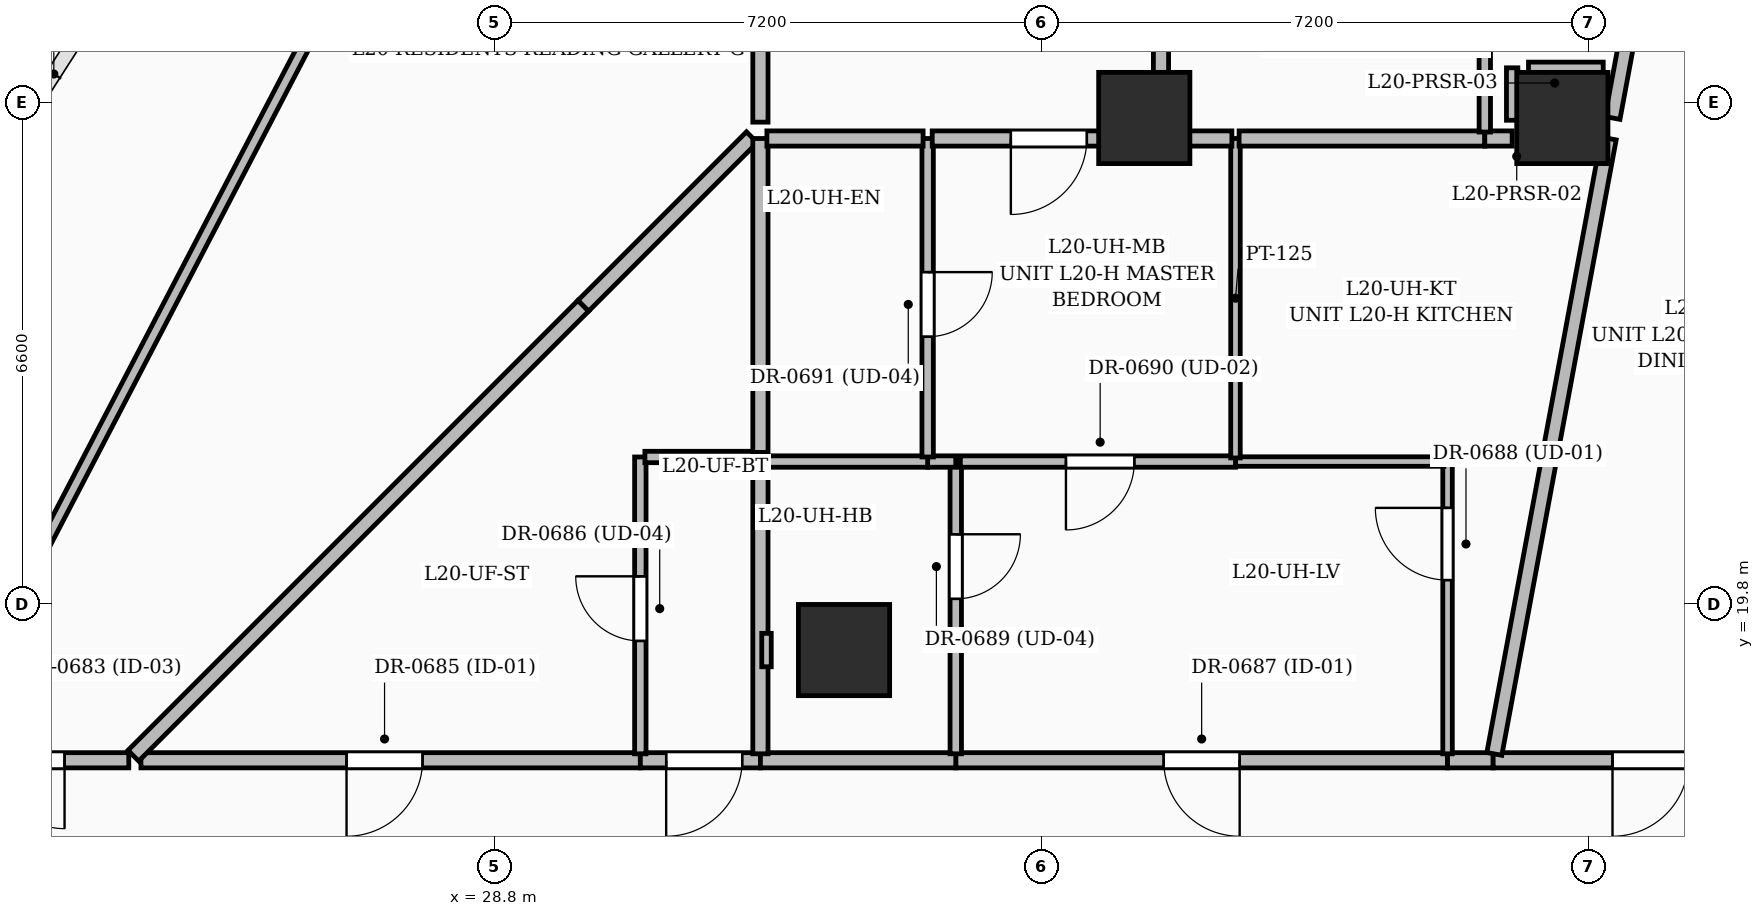
"""IFC4 building model, lengths in metres.
Left out: names, types, materials, properties, quantities, classifications, styles, units other than length and angle.
Written with IfcOpenShell. Run it as: python <this file> out.ifc"""

import sys

from ifc_helpers import new_model, si_unit, direction, frame, frame_2d, origin, origin_2d, place, context, subcontext, project, spatial, rectangle, extrude, element, fill, save


model = new_model("IFC4")
c1 = context("Model", 3, precision=1e-05, world=origin(), true_north=direction((0.0, 1.0)))
c2 = subcontext(c1, "Body", "Model", "MODEL_VIEW")
j1 = project(units=[si_unit("LENGTHUNIT", "METRE"), si_unit("PLANEANGLEUNIT", "RADIAN")], contexts=[c1])
p1 = place(None, origin())
s1 = spatial("IfcSite", under=j1, at=p1, CompositionType="ELEMENT")
p2 = place(p1, origin())
s2 = spatial("IfcBuilding", under=s1, at=p2, CompositionType="ELEMENT")
p3 = place(p2, frame((0.0, 0.0, 82.2)))
s3 = spatial("IfcBuildingStorey", under=s2, at=p3, CompositionType="ELEMENT", Elevation=82.2)
for number, where, z_axis, x_axis in (
    (1, (42.85, 26.2, 0.0), (0.0, 0.0, 1.0), (1.0, 0.0, 0.0)),
    (2, (37.35, 26.2, 0.0), (0.0, 0.0, 1.0), (1.0, 0.0, 0.0)),
    (3, (33.4, 19.2, 0.0), (0.0, 0.0, 1.0), (1.0, 0.0, 0.0)),
):
    element("IfcColumn", number, at=place(p3, frame(where, z_axis=z_axis, x_axis=x_axis)), inside=s3, PredefinedType="COLUMN", context=c2, shape_type="SweptSolid", body=[
        extrude(rectangle(XDim=1.2, YDim=1.2, at=origin_2d()), origin(), (0.0, 0.0, 1.0), 3.6),
    ])
p4 = place(p3, frame((30.72, 17.75, 0.0), z_axis=(0.0, 0.0, 1.0), x_axis=(-1.0, 0.0, 0.0)))
e4 = element("IfcWall", 4, at=p4, inside=s3, PredefinedType="PARTITIONING", context=c2, shape_type="SweptSolid", body=[
    extrude(rectangle(XDim=6.57, YDim=0.2, at=frame_2d((3.285, 0.0))), origin(), (0.0, 0.0, 1.0), 2.345),
])
p5 = place(p4, frame((2.865, 0.0, 0.0)))
e5 = element("IfcOpeningElement", 5, at=p5, cuts=e4, PredefinedType="OPENING", context=c2, shape_type="SweptSolid", body=[
    extrude(rectangle(XDim=1.0, YDim=2.2, at=frame_2d((0.5, 1.1))), frame((0.0, 0.11, 0.0), z_axis=(0.0, -1.0, 0.0), x_axis=(1.0, 0.0, 0.0)), (0.0, 0.0, 1.0), 0.22),
])
p6 = place(p3, frame((32.3, 17.75, 0.0), z_axis=(0.0, 0.0, 1.0), x_axis=(-1.0, 0.0, 0.0)))
e6 = element("IfcWall", 6, at=p6, inside=s3, PredefinedType="PARTITIONING", context=c2, shape_type="SweptSolid", body=[
    extrude(rectangle(XDim=1.58, YDim=0.2, at=frame_2d((0.79, 0.0))), origin(), (0.0, 0.0, 1.0), 3.35),
])
p7 = place(p6, frame((0.24, 0.0, 0.0)))
e7 = element("IfcOpeningElement", 7, at=p7, cuts=e6, PredefinedType="OPENING", context=c2, shape_type="SweptSolid", body=[
    extrude(rectangle(XDim=1.0, YDim=2.2, at=frame_2d((0.5, 1.1))), frame((0.0, 0.11, 0.0), z_axis=(0.0, -1.0, 0.0), x_axis=(1.0, 0.0, 0.0)), (0.0, 0.0, 1.0), 0.22),
])
p8 = place(p3, frame((23.99, 17.75, 0.0), z_axis=(0.0, 0.0, 1.0), x_axis=(-1.0, 0.0, 0.0)))
e8 = element("IfcWall", 8, at=p8, inside=s3, PredefinedType="PARTITIONING", context=c2, shape_type="SweptSolid", body=[
    extrude(rectangle(XDim=2.505, YDim=0.2, at=frame_2d((1.252, 0.0))), origin(), (0.0, 0.0, 1.0), 2.345),
])
p9 = place(p8, frame((0.845, 0.0, 0.0)))
e9 = element("IfcOpeningElement", 9, at=p9, cuts=e8, PredefinedType="OPENING", context=c2, shape_type="SweptSolid", body=[
    extrude(rectangle(XDim=0.9, YDim=2.1, at=frame_2d((0.45, 1.05))), frame((0.0, 0.11, 0.0), z_axis=(0.0, -1.0, 0.0), x_axis=(1.0, 0.0, 0.0)), (0.0, 0.0, 1.0), 0.22),
])
p10 = place(p3, frame((41.34, 17.75, 0.0), z_axis=(0.0, 0.0, 1.0), x_axis=(-1.0, 0.0, 0.0)))
e10 = element("IfcWall", 10, at=p10, inside=s3, PredefinedType="PARTITIONING", context=c2, shape_type="SweptSolid", body=[
    extrude(rectangle(XDim=6.47, YDim=0.2, at=frame_2d((3.235, 0.0))), origin(), (0.0, 0.0, 1.0), 3.35),
])
p11 = place(p10, frame((2.735, 0.0, 0.0)))
e11 = element("IfcOpeningElement", 11, at=p11, cuts=e10, PredefinedType="OPENING", context=c2, shape_type="SweptSolid", body=[
    extrude(rectangle(XDim=1.0, YDim=2.2, at=frame_2d((0.5, 1.1))), frame((0.0, 0.11, 0.0), z_axis=(0.0, -1.0, 0.0), x_axis=(1.0, 0.0, 0.0)), (0.0, 0.0, 1.0), 0.22),
])
p12 = place(p3, frame((34.87, 17.75, 0.0), z_axis=(0.0, 0.0, 1.0), x_axis=(-1.0, 0.0, 0.0)))
e12 = element("IfcWall", 12, at=p12, inside=s3, PredefinedType="PARTITIONING", context=c2, shape_type="SweptSolid", body=[
    extrude(rectangle(XDim=2.57, YDim=0.2, at=frame_2d((1.285, 0.0))), origin(), (0.0, 0.0, 1.0), 2.309),
])
p13 = place(p3, frame((41.94, 17.75, 0.0), z_axis=(0.0, 0.0, 1.0), x_axis=(-1.0, 0.0, 0.0)))
e13 = element("IfcWall", 13, at=p13, inside=s3, PredefinedType="PARTITIONING", context=c2, shape_type="SweptSolid", body=[
    extrude(rectangle(XDim=0.6, YDim=0.2, at=frame_2d((0.3, 0.0))), origin(), (0.0, 0.0, 1.0), 3.35),
])
p14 = place(p3, frame((47.51, 17.75, 0.0), z_axis=(0.0, 0.0, 1.0), x_axis=(-1.0, 0.0, 0.0)))
e14 = element("IfcWall", 14, at=p14, inside=s3, PredefinedType="PARTITIONING", context=c2, shape_type="SweptSolid", body=[
    extrude(rectangle(XDim=5.57, YDim=0.2, at=frame_2d((2.785, 0.0))), origin(), (0.0, 0.0, 1.0), 2.309),
])
p15 = place(p14, frame((3.0, 0.0, 0.0)))
e15 = element("IfcOpeningElement", 15, at=p15, cuts=e14, PredefinedType="OPENING", context=c2, shape_type="SweptSolid", body=[
    extrude(rectangle(XDim=1.0, YDim=2.2, at=frame_2d((0.5, 1.1))), frame((0.0, 0.11, 0.0), z_axis=(0.0, -1.0, 0.0), x_axis=(1.0, 0.0, 0.0)), (0.0, 0.0, 1.0), 0.22),
])
p16 = place(p3, frame((21.4, 17.75, 0.0), z_axis=(0.0, 0.0, 1.0), x_axis=(0.46207959711, 0.886838455376, 0.0)))
e16 = element("IfcWall", 16, at=p16, inside=s3, PredefinedType="PARTITIONING", context=c2, shape_type="SweptSolid", body=[
    extrude(rectangle(XDim=23.589, YDim=0.15, at=frame_2d((11.795, 0.0))), origin(), (0.0, 0.0, 1.0), 2.345),
])
p17 = place(p3, frame((30.72, 17.835, 0.0), z_axis=(0.0, 0.0, 1.0), x_axis=(0.0, 1.0, 0.0)))
e17 = element("IfcWall", 17, at=p17, inside=s3, PredefinedType="PARTITIONING", context=c2, shape_type="SweptSolid", body=[
    extrude(rectangle(XDim=3.905, YDim=0.15, at=frame_2d((1.953, 0.0))), origin(), (0.0, 0.0, 1.0), 2.345),
])
p18 = place(p17, frame((1.485, 0.0, 0.0)))
e18 = element("IfcOpeningElement", 18, at=p18, cuts=e17, PredefinedType="OPENING", context=c2, shape_type="SweptSolid", body=[
    extrude(rectangle(XDim=0.85, YDim=2.1, at=frame_2d((0.425, 1.05))), frame((0.0, 0.085, 0.0), z_axis=(0.0, -1.0, 0.0), x_axis=(1.0, 0.0, 0.0)), (0.0, 0.0, 1.0), 0.17),
])
p19 = place(p3, frame((29.97, 23.73, 0.0), z_axis=(0.0, 0.0, 1.0), x_axis=(-0.707106781187, -0.707106781187, 0.0)))
e19 = element("IfcWall", 19, at=p19, inside=s3, PredefinedType="PARTITIONING", context=c2, shape_type="SweptSolid", body=[
    extrude(rectangle(XDim=8.372, YDim=0.2, at=frame_2d((4.186, 0.0))), origin(), (0.0, 0.0, 1.0), 2.345),
])
p20 = place(p3, frame((30.78, 21.74, 0.0), z_axis=(0.0, 0.0, 1.0), x_axis=(1.0, 0.0, 0.0)))
e20 = element("IfcWall", 20, at=p20, inside=s3, PredefinedType="PARTITIONING", context=c2, shape_type="SweptSolid", body=[
    extrude(rectangle(XDim=1.52, YDim=0.15, at=frame_2d((0.76, 0.0))), origin(), (0.0, 0.0, 1.0), 2.345),
])
p21 = place(p3, frame((32.187, 25.947, 0.0), z_axis=(0.0, 0.0, 1.0), x_axis=(-0.707106781187, -0.707106781187, 0.0)))
e21 = element("IfcWall", 21, at=p21, inside=s3, PredefinedType="PARTITIONING", context=c2, shape_type="SweptSolid", body=[
    extrude(rectangle(XDim=3.135, YDim=0.2, at=frame_2d((1.568, 0.0))), origin(), (0.0, 0.0, 1.0), 3.35),
])
p22 = place(p3, frame((32.3, 21.8, 0.0), z_axis=(0.0, 0.0, 1.0), x_axis=(0.0, 1.0, 0.0)))
e22 = element("IfcWall", 22, at=p22, inside=s3, PredefinedType="PARTITIONING", context=c2, shape_type="SweptSolid", body=[
    extrude(rectangle(XDim=4.13, YDim=0.2, at=frame_2d((2.065, 0.0))), origin(), (0.0, 0.0, 1.0), 2.709),
])
p23 = place(p3, frame((32.3, 17.835, 0.0), z_axis=(0.0, 0.0, 1.0), x_axis=(0.0, 1.0, 0.0)))
e23 = element("IfcWall", 23, at=p23, inside=s3, PredefinedType="PARTITIONING", context=c2, shape_type="SweptSolid", body=[
    extrude(rectangle(XDim=3.845, YDim=0.2, at=frame_2d((1.922, 0.0))), origin(), (0.0, 0.0, 1.0), 2.345),
])
p24 = place(p3, frame((32.3, 26.145, 0.0), z_axis=(0.0, 0.0, 1.0), x_axis=(0.0, 1.0, 0.0)))
e24 = element("IfcWall", 24, at=p24, inside=s3, PredefinedType="PARTITIONING", context=c2, shape_type="SweptSolid", body=[
    extrude(rectangle(XDim=10.775, YDim=0.2, at=frame_2d((5.387, 0.0))), origin(), (0.0, 0.0, 1.0), 2.345),
])
p25 = place(p3, frame((34.87, 21.68, 0.0), z_axis=(0.0, 0.0, 1.0), x_axis=(0.0, -1.0, 0.0)))
e25 = element("IfcWall", 25, at=p25, inside=s3, PredefinedType="PARTITIONING", context=c2, shape_type="SweptSolid", body=[
    extrude(rectangle(XDim=3.845, YDim=0.15, at=frame_2d((1.922, 0.0))), origin(), (0.0, 0.0, 1.0), 2.309),
])
p26 = place(p25, frame((0.957, 0.0, 0.0)))
e26 = element("IfcOpeningElement", 26, at=p26, cuts=e25, PredefinedType="OPENING", context=c2, shape_type="SweptSolid", body=[
    extrude(rectangle(XDim=0.85, YDim=2.1, at=frame_2d((0.425, 1.05))), frame((0.0, 0.085, 0.0), z_axis=(0.0, -1.0, 0.0), x_axis=(1.0, 0.0, 0.0)), (0.0, 0.0, 1.0), 0.17),
])
p27 = place(p3, frame((41.34, 17.835, 0.0), z_axis=(0.0, 0.0, 1.0), x_axis=(0.0, 1.0, 0.0)))
e27 = element("IfcWall", 27, at=p27, inside=s3, PredefinedType="PARTITIONING", context=c2, shape_type="SweptSolid", body=[
    extrude(rectangle(XDim=3.845, YDim=0.125, at=frame_2d((1.922, 0.0))), origin(), (0.0, 0.0, 1.0), 3.35),
])
p28 = place(p27, frame((2.285, 0.0, 0.0)))
e28 = element("IfcOpeningElement", 28, at=p28, cuts=e27, PredefinedType="OPENING", context=c2, shape_type="SweptSolid", body=[
    extrude(rectangle(XDim=0.95, YDim=2.2, at=frame_2d((0.475, 1.1))), frame((0.0, 0.072, 0.0), z_axis=(0.0, -1.0, 0.0), x_axis=(1.0, 0.0, 0.0)), (0.0, 0.0, 1.0), 0.145),
])
p29 = place(p3, frame((41.292, 21.68, 0.0), z_axis=(0.0, 0.0, 1.0), x_axis=(-1.0, 0.0, 0.0)))
e29 = element("IfcWall", 29, at=p29, inside=s3, PredefinedType="PARTITIONING", context=c2, shape_type="SweptSolid", body=[
    extrude(rectangle(XDim=2.742, YDim=0.125, at=frame_2d((1.371, 0.0))), origin(), (0.0, 0.0, 1.0), 3.35),
])
p30 = place(p3, frame((38.55, 21.68, 0.0), z_axis=(0.0, 0.0, 1.0), x_axis=(-1.0, 0.0, 0.0)))
e30 = element("IfcWall", 30, at=p30, inside=s3, PredefinedType="PARTITIONING", context=c2, shape_type="SweptSolid", body=[
    extrude(rectangle(XDim=3.62, YDim=0.15, at=frame_2d((1.81, 0.0))), origin(), (0.0, 0.0, 1.0), 2.309),
])
p31 = place(p30, frame((1.331, 0.0, 0.0)))
e31 = element("IfcOpeningElement", 31, at=p31, cuts=e30, PredefinedType="OPENING", context=c2, shape_type="SweptSolid", body=[
    extrude(rectangle(XDim=0.9, YDim=2.15, at=frame_2d((0.45, 1.075))), frame((0.0, 0.085, 0.0), z_axis=(0.0, -1.0, 0.0), x_axis=(1.0, 0.0, 0.0)), (0.0, 0.0, 1.0), 0.17),
])
p32 = place(p3, frame((34.87, 21.68, 0.0), z_axis=(0.0, 0.0, 1.0), x_axis=(-1.0, 0.0, 0.0)))
e32 = element("IfcWall", 32, at=p32, inside=s3, PredefinedType="PARTITIONING", context=c2, shape_type="SweptSolid", body=[
    extrude(rectangle(XDim=0.37, YDim=0.15, at=frame_2d((0.185, 0.0))), origin(), (0.0, 0.0, 1.0), 2.309),
])
p33 = place(p3, frame((34.5, 21.68, 0.0), z_axis=(0.0, 0.0, 1.0), x_axis=(-1.0, 0.0, 0.0)))
e33 = element("IfcWall", 33, at=p33, inside=s3, PredefinedType="PARTITIONING", context=c2, shape_type="SweptSolid", body=[
    extrude(rectangle(XDim=2.115, YDim=0.15, at=frame_2d((1.058, 0.0))), origin(), (0.0, 0.0, 1.0), 3.35),
])
p34 = place(p3, frame((38.55, 25.93, 0.0), z_axis=(0.0, 0.0, 1.0), x_axis=(0.0, -1.0, 0.0)))
e34 = element("IfcWall", 34, at=p34, inside=s3, PredefinedType="PARTITIONING", context=c2, shape_type="SweptSolid", body=[
    extrude(rectangle(XDim=4.202, YDim=0.125, at=frame_2d((2.101, 0.0))), origin(), (0.0, 0.0, 1.0), 2.37),
])
p35 = place(p3, frame((41.956, 17.833, 0.0), z_axis=(0.0, 0.0, 1.0), x_axis=(0.182682671213, 0.98317192883, 0.0)))
e35 = element("IfcWall", 35, at=p35, inside=s3, PredefinedType="PARTITIONING", context=c2, shape_type="SweptSolid", body=[
    extrude(rectangle(XDim=8.235, YDim=0.2, at=frame_2d((4.118, 0.0))), origin(), (0.0, 0.0, 1.0), 2.309),
])
p36 = place(p3, frame((41.83, 25.93, 0.0), z_axis=(0.0, 0.0, 1.0), x_axis=(-1.0, 0.0, 0.0)))
e36 = element("IfcWall", 36, at=p36, inside=s3, PredefinedType="PARTITIONING", context=c2, shape_type="SweptSolid", body=[
    extrude(rectangle(XDim=3.233, YDim=0.2, at=frame_2d((1.616, 0.0))), origin(), (0.0, 0.0, 1.0), 2.37),
])
p37 = place(p3, frame((42.19, 25.93, 0.0), z_axis=(0.0, 0.0, 1.0), x_axis=(-1.0, 0.0, 0.0)))
e37 = element("IfcWall", 37, at=p37, inside=s3, PredefinedType="PARTITIONING", context=c2, shape_type="SweptSolid", body=[
    extrude(rectangle(XDim=0.36, YDim=0.2, at=frame_2d((0.18, 0.0))), origin(), (0.0, 0.0, 1.0), 2.37),
])
p38 = place(p3, frame((34.5, 25.93, 0.0), z_axis=(0.0, 0.0, 1.0), x_axis=(0.0, -1.0, 0.0)))
e38 = element("IfcWall", 38, at=p38, inside=s3, PredefinedType="PARTITIONING", context=c2, shape_type="SweptSolid", body=[
    extrude(rectangle(XDim=4.19, YDim=0.15, at=frame_2d((2.095, 0.0))), origin(), (0.0, 0.0, 1.0), 3.35),
])
p39 = place(p38, frame((1.758, 0.0, 0.0)))
e39 = element("IfcOpeningElement", 39, at=p39, cuts=e38, PredefinedType="OPENING", context=c2, shape_type="SweptSolid", body=[
    extrude(rectangle(XDim=0.85, YDim=2.1, at=frame_2d((0.425, 1.05))), frame((0.0, 0.085, 0.0), z_axis=(0.0, -1.0, 0.0), x_axis=(1.0, 0.0, 0.0)), (0.0, 0.0, 1.0), 0.17),
])
p40 = place(p3, frame((37.57, 25.93, 0.0), z_axis=(0.0, 0.0, 1.0), x_axis=(-1.0, 0.0, 0.0)))
e40 = element("IfcWall", 40, at=p40, inside=s3, PredefinedType="PARTITIONING", context=c2, shape_type="SweptSolid", body=[
    extrude(rectangle(XDim=3.01, YDim=0.2, at=frame_2d((1.505, 0.0))), origin(), (0.0, 0.0, 1.0), 3.35),
])
p41 = place(p40, frame((0.975, 0.0, 0.0)))
e41 = element("IfcOpeningElement", 41, at=p41, cuts=e40, PredefinedType="OPENING", context=c2, shape_type="SweptSolid", body=[
    extrude(rectangle(XDim=1.0, YDim=2.2, at=frame_2d((0.5, 1.1))), frame((0.0, 0.11, 0.0), z_axis=(0.0, -1.0, 0.0), x_axis=(1.0, 0.0, 0.0)), (0.0, 0.0, 1.0), 0.22),
])
p42 = place(p3, frame((38.502, 25.93, 0.0), z_axis=(0.0, 0.0, 1.0), x_axis=(-1.0, 0.0, 0.0)))
e42 = element("IfcWall", 42, at=p42, inside=s3, PredefinedType="PARTITIONING", context=c2, shape_type="SweptSolid", body=[
    extrude(rectangle(XDim=0.932, YDim=0.2, at=frame_2d((0.466, 0.0))), origin(), (0.0, 0.0, 1.0), 2.37),
])
p43 = place(p3, frame((34.44, 25.93, 0.0), z_axis=(0.0, 0.0, 1.0), x_axis=(-1.0, 0.0, 0.0)))
e43 = element("IfcWall", 43, at=p43, inside=s3, PredefinedType="PARTITIONING", context=c2, shape_type="SweptSolid", body=[
    extrude(rectangle(XDim=2.055, YDim=0.2, at=frame_2d((1.027, 0.0))), origin(), (0.0, 0.0, 1.0), 2.709),
])
p44 = place(p3, frame((44.0, 28.84, 0.0), z_axis=(0.0, 0.0, 1.0), x_axis=(-0.18247668152, -0.983210181345, 0.0)))
e44 = element("IfcWall", 44, at=p44, inside=s3, PredefinedType="PARTITIONING", context=c2, shape_type="SweptSolid", body=[
    extrude(rectangle(XDim=2.685, YDim=0.2, at=frame_2d((1.343, 0.0))), origin(), (0.0, 0.0, 1.0), 2.709),
])
p45 = place(p3, frame((37.57, 26.015, 0.0), z_axis=(0.0, 0.0, 1.0), x_axis=(0.0, 1.0, 0.0)))
e45 = element("IfcWall", 45, at=p45, inside=s3, PredefinedType="PARTITIONING", context=c2, shape_type="SweptSolid", body=[
    extrude(rectangle(XDim=3.855, YDim=0.2, at=frame_2d((1.928, 0.0))), origin(), (0.0, 0.0, 1.0), 2.709),
])
p46 = place(p3, frame((41.83, 26.015, 0.0), z_axis=(0.0, 0.0, 1.0), x_axis=(0.0, 1.0, 0.0)))
e46 = element("IfcWall", 46, at=p46, inside=s3, PredefinedType="PARTITIONING", context=c2, shape_type="SweptSolid", body=[
    extrude(rectangle(XDim=2.825, YDim=0.15, at=frame_2d((1.413, 0.0))), origin(), (0.0, 0.0, 1.0), 2.37),
])
p47 = place(p3, frame((42.19, 26.17, 0.0), z_axis=(0.0, 0.0, 1.0), x_axis=(0.0, 1.0, 0.0)))
e47 = element("IfcWall", 47, at=p47, inside=s3, PredefinedType="PARTITIONING", context=c2, shape_type="SweptSolid", body=[
    extrude(rectangle(XDim=0.69, YDim=0.15, at=frame_2d((0.345, 0.0))), origin(), (0.0, 0.0, 1.0), 2.37),
])
p48 = place(p3, frame((42.405, 26.86, 0.0), z_axis=(0.0, 0.0, 1.0), x_axis=(1.0, 0.0, 0.0)))
e48 = element("IfcWall", 48, at=p48, inside=s3, PredefinedType="PARTITIONING", context=c2, shape_type="SweptSolid", body=[
    extrude(rectangle(XDim=0.983, YDim=0.15, at=frame_2d((0.491, 0.0))), origin(), (0.0, 0.0, 1.0), 2.345),
])
p49 = place(p3, frame((32.38, 18.98, 0.0), z_axis=(0.0, 0.0, 1.0), x_axis=(0.0, 1.0, 0.0)))
e49 = element("IfcWall", 49, at=p49, inside=s3, PredefinedType="PARTITIONING", context=c2, shape_type="SweptSolid", body=[
    extrude(rectangle(XDim=0.44, YDim=0.125, at=frame_2d((0.22, 0.0))), origin(), (0.0, 0.0, 1.0), 3.35),
])
p50 = place(p9, origin())
e50 = element("IfcDoor", 50, at=p50, inside=s3, OperationType="SINGLE_SWING_LEFT", PredefinedType="DOOR", context=c2, shape_type="SweptSolid", body=[
    extrude(rectangle(XDim=0.9, YDim=2.1, at=frame_2d((0.45, 1.05))), frame((0.0, 0.025, 0.0), z_axis=(0.0, -1.0, 0.0), x_axis=(1.0, 0.0, 0.0)), (0.0, 0.0, 1.0), 0.05),
])
fill(e9, e50)
p51 = place(p5, origin())
e51 = element("IfcDoor", 51, at=p51, inside=s3, OperationType="SINGLE_SWING_RIGHT", PredefinedType="DOOR", context=c2, shape_type="SweptSolid", body=[
    extrude(rectangle(XDim=1.0, YDim=2.2, at=frame_2d((0.5, 1.1))), frame((0.0, 0.025, 0.0), z_axis=(0.0, -1.0, 0.0), x_axis=(1.0, 0.0, 0.0)), (0.0, 0.0, 1.0), 0.05),
])
fill(e5, e51)
p52 = place(p18, origin())
e52 = element("IfcDoor", 52, at=p52, inside=s3, OperationType="SINGLE_SWING_RIGHT", PredefinedType="DOOR", context=c2, shape_type="SweptSolid", body=[
    extrude(rectangle(XDim=0.85, YDim=2.1, at=frame_2d((0.425, 1.05))), frame((0.0, 0.025, 0.0), z_axis=(0.0, -1.0, 0.0), x_axis=(1.0, 0.0, 0.0)), (0.0, 0.0, 1.0), 0.05),
])
fill(e18, e52)
p53 = place(p11, origin())
e53 = element("IfcDoor", 53, at=p53, inside=s3, OperationType="SINGLE_SWING_LEFT", PredefinedType="DOOR", context=c2, shape_type="SweptSolid", body=[
    extrude(rectangle(XDim=1.0, YDim=2.2, at=frame_2d((0.5, 1.1))), frame((0.0, 0.025, 0.0), z_axis=(0.0, -1.0, 0.0), x_axis=(1.0, 0.0, 0.0)), (0.0, 0.0, 1.0), 0.05),
])
fill(e11, e53)
p54 = place(p28, origin())
e54 = element("IfcDoor", 54, at=p54, inside=s3, OperationType="SINGLE_SWING_RIGHT", PredefinedType="DOOR", context=c2, shape_type="SweptSolid", body=[
    extrude(rectangle(XDim=0.95, YDim=2.2, at=frame_2d((0.475, 1.1))), frame((0.0, 0.025, 0.0), z_axis=(0.0, -1.0, 0.0), x_axis=(1.0, 0.0, 0.0)), (0.0, 0.0, 1.0), 0.05),
])
fill(e28, e54)
p55 = place(p26, origin())
e55 = element("IfcDoor", 55, at=p55, inside=s3, OperationType="SINGLE_SWING_LEFT", PredefinedType="DOOR", context=c2, shape_type="SweptSolid", body=[
    extrude(rectangle(XDim=0.85, YDim=2.1, at=frame_2d((0.425, 1.05))), frame((0.0, 0.025, 0.0), z_axis=(0.0, -1.0, 0.0), x_axis=(1.0, 0.0, 0.0)), (0.0, 0.0, 1.0), 0.05),
])
fill(e26, e55)
p56 = place(p31, origin())
e56 = element("IfcDoor", 56, at=p56, inside=s3, OperationType="SINGLE_SWING_RIGHT", PredefinedType="DOOR", context=c2, shape_type="SweptSolid", body=[
    extrude(rectangle(XDim=0.9, YDim=2.15, at=frame_2d((0.45, 1.075))), frame((0.0, 0.025, 0.0), z_axis=(0.0, -1.0, 0.0), x_axis=(1.0, 0.0, 0.0)), (0.0, 0.0, 1.0), 0.05),
])
fill(e31, e56)
p57 = place(p39, origin())
e57 = element("IfcDoor", 57, at=p57, inside=s3, OperationType="SINGLE_SWING_LEFT", PredefinedType="DOOR", context=c2, shape_type="SweptSolid", body=[
    extrude(rectangle(XDim=0.85, YDim=2.1, at=frame_2d((0.425, 1.05))), frame((0.0, 0.025, 0.0), z_axis=(0.0, -1.0, 0.0), x_axis=(1.0, 0.0, 0.0)), (0.0, 0.0, 1.0), 0.05),
])
fill(e39, e57)
p58 = place(p15, origin())
e58 = element("IfcDoor", 58, at=p58, inside=s3, OperationType="SINGLE_SWING_RIGHT", PredefinedType="DOOR", context=c2, shape_type="SweptSolid", body=[
    extrude(rectangle(XDim=1.0, YDim=2.2, at=frame_2d((0.5, 1.1))), frame((0.0, 0.025, 0.0), z_axis=(0.0, -1.0, 0.0), x_axis=(1.0, 0.0, 0.0)), (0.0, 0.0, 1.0), 0.05),
])
fill(e15, e58)
p59 = place(p41, origin())
e59 = element("IfcDoor", 59, at=p59, inside=s3, OperationType="SINGLE_SWING_RIGHT", PredefinedType="DOOR", context=c2, shape_type="SweptSolid", body=[
    extrude(rectangle(XDim=1.0, YDim=2.2, at=frame_2d((0.5, 1.1))), frame((0.0, 0.025, 0.0), z_axis=(0.0, -1.0, 0.0), x_axis=(1.0, 0.0, 0.0)), (0.0, 0.0, 1.0), 0.05),
])
fill(e41, e59)
p60 = place(p7, origin())
e60 = element("IfcDoor", 60, at=p60, inside=s3, OperationType="SINGLE_SWING_RIGHT", PredefinedType="DOOR", context=c2, shape_type="SweptSolid", body=[
    extrude(rectangle(XDim=1.0, YDim=2.2, at=frame_2d((0.5, 1.1))), frame((0.0, 0.025, 0.0), z_axis=(0.0, -1.0, 0.0), x_axis=(1.0, 0.0, 0.0)), (0.0, 0.0, 1.0), 0.05),
])
fill(e7, e60)
save(model, sys.argv[1])
